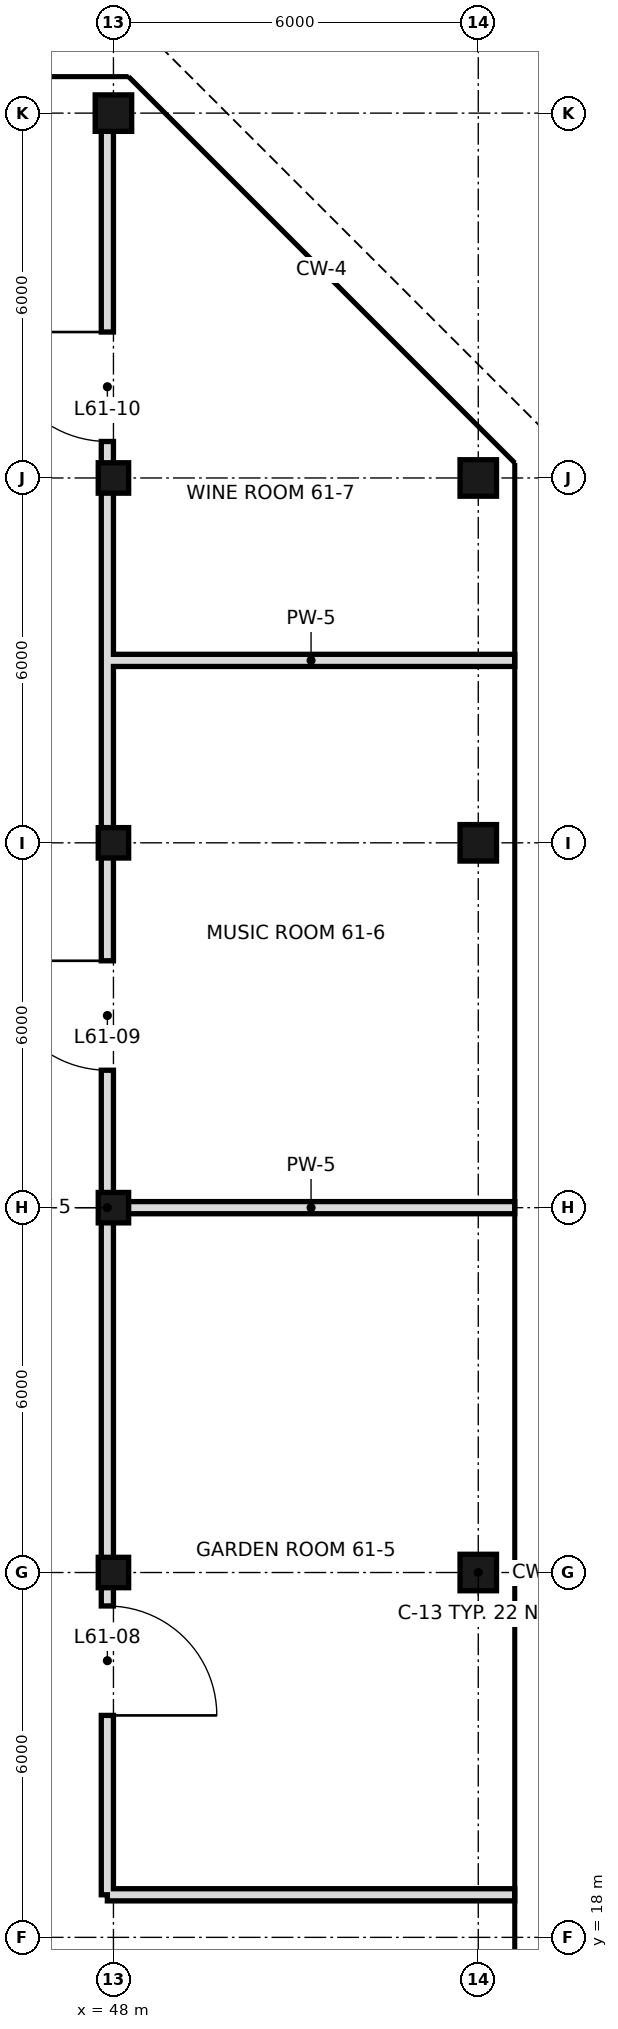
"""IFC4 building model, lengths in metres.
Left out: names, types, materials, properties, quantities, classifications, styles, units other than length and angle.
Written with IfcOpenShell. Run it as: python <this file> out.ifc"""

import sys

from ifc_helpers import new_model, si_unit, direction, frame, frame_2d, origin, origin_2d, place, context, subcontext, project, spatial, rectangle, hollow_rectangle, extrude, element, fill, save


model = new_model("IFC4")
c1 = context("Model", 3, precision=1e-05, world=origin(), true_north=direction((0.0, 1.0)))
c2 = subcontext(c1, "Body", "Model", "MODEL_VIEW")
j1 = project(units=[si_unit("LENGTHUNIT", "METRE"), si_unit("PLANEANGLEUNIT", "RADIAN")], contexts=[c1])
p1 = place(None, origin())
s1 = spatial("IfcSite", under=j1, at=p1, CompositionType="ELEMENT")
p2 = place(p1, origin())
s2 = spatial("IfcBuilding", under=s1, at=p2, CompositionType="ELEMENT")
p3 = place(p2, frame((0.0, 0.0, 257.6)))
s3 = spatial("IfcBuildingStorey", under=s2, at=p3, CompositionType="ELEMENT", Elevation=257.6)
for number, where, z_axis, x_axis in (
    (1, (48.0, 24.0, 0.0), (0.0, 0.0, 1.0), (1.0, 0.0, 0.0)),
    (2, (48.0, 30.0, 0.0), (0.0, 0.0, 1.0), (1.0, 0.0, 0.0)),
    (3, (48.0, 36.0, 0.0), (0.0, 0.0, 1.0), (1.0, 0.0, 0.0)),
    (4, (48.0, 42.0, 0.0), (0.0, 0.0, 1.0), (1.0, 0.0, 0.0)),
):
    element("IfcColumn", number, at=place(p3, frame(where, z_axis=z_axis, x_axis=x_axis)), inside=s3, PredefinedType="COLUMN", context=c2, shape_type="SweptSolid", body=[
        extrude(hollow_rectangle(XDim=0.5, YDim=0.5, WallThickness=0.025, at=origin_2d()), origin(), (0.0, 0.0, 1.0), 5.4),
    ])
for number, where, z_axis, x_axis in (
    (5, (48.0, 48.0, 0.0), (0.0, 0.0, 1.0), (1.0, 0.0, 0.0)),
    (6, (54.0, 24.0, 0.0), (0.0, 0.0, 1.0), (1.0, 0.0, 0.0)),
    (7, (54.0, 36.0, 0.0), (0.0, 0.0, 1.0), (1.0, 0.0, 0.0)),
    (8, (54.0, 42.0, 0.0), (0.0, 0.0, 1.0), (1.0, 0.0, 0.0)),
):
    element("IfcColumn", number, at=place(p3, frame(where, z_axis=z_axis, x_axis=x_axis)), inside=s3, PredefinedType="COLUMN", context=c2, shape_type="SweptSolid", body=[
        extrude(hollow_rectangle(XDim=0.6, YDim=0.6, WallThickness=0.028, at=origin_2d()), origin(), (0.0, 0.0, 1.0), 5.4),
    ])
p4 = place(p3, frame((47.9, 18.7, 0.0), z_axis=(0.0, 0.0, 1.0), x_axis=(0.0, 1.0, 0.0)))
e9 = element("IfcWall", 9, at=p4, inside=s3, PredefinedType="SOLIDWALL", context=c2, shape_type="SweptSolid", body=[
    extrude(rectangle(XDim=29.3, YDim=0.2, at=frame_2d((14.65, 0.0))), origin(), (0.0, 0.0, 1.0), 4.52),
])
p5 = place(p4, frame((2.95, 0.0, 0.0)))
e10 = element("IfcOpeningElement", 10, at=p5, cuts=e9, PredefinedType="OPENING", context=c2, shape_type="SweptSolid", body=[
    extrude(rectangle(XDim=1.8, YDim=2.4, at=frame_2d((0.9, 1.2))), frame((0.0, 0.11, 0.0), z_axis=(0.0, -1.0, 0.0), x_axis=(1.0, 0.0, 0.0)), (0.0, 0.0, 1.0), 0.22),
])
p6 = place(p4, frame((13.56, 0.0, 0.0)))
e11 = element("IfcOpeningElement", 11, at=p6, cuts=e9, PredefinedType="OPENING", context=c2, shape_type="SweptSolid", body=[
    extrude(rectangle(XDim=1.8, YDim=2.4, at=frame_2d((0.9, 1.2))), frame((0.0, 0.11, 0.0), z_axis=(0.0, -1.0, 0.0), x_axis=(1.0, 0.0, 0.0)), (0.0, 0.0, 1.0), 0.22),
])
p7 = place(p4, frame((23.9, 0.0, 0.0)))
e12 = element("IfcOpeningElement", 12, at=p7, cuts=e9, PredefinedType="OPENING", context=c2, shape_type="SweptSolid", body=[
    extrude(rectangle(XDim=1.8, YDim=2.4, at=frame_2d((0.9, 1.2))), frame((0.0, 0.11, 0.0), z_axis=(0.0, -1.0, 0.0), x_axis=(1.0, 0.0, 0.0)), (0.0, 0.0, 1.0), 0.22),
])
for number, where, z_axis, x_axis in (
    (13, (47.9, 18.7, 0.0), (0.0, 0.0, 1.0), (1.0, 0.0, 0.0)),
    (14, (47.9, 30.0, 0.0), (0.0, 0.0, 1.0), (1.0, 0.0, 0.0)),
):
    element("IfcWall", number, at=place(p3, frame(where, z_axis=z_axis, x_axis=x_axis)), inside=s3, PredefinedType="SOLIDWALL", context=c2, shape_type="SweptSolid", body=[
        extrude(rectangle(XDim=6.7, YDim=0.2, at=frame_2d((3.35, 0.0))), origin(), (0.0, 0.0, 1.0), 4.52),
    ])
p8 = place(p3, frame((47.9, 39.0, 0.0), z_axis=(0.0, 0.0, 1.0), x_axis=(1.0, 0.0, 0.0)))
e15 = element("IfcWall", 15, at=p8, inside=s3, PredefinedType="SOLIDWALL", context=c2, shape_type="SweptSolid", body=[
    extrude(rectangle(XDim=6.7, YDim=0.2, at=frame_2d((3.35, 0.0))), origin(), (0.0, 0.0, 1.0), 4.77),
])
p9 = place(p5, frame((1.8, 0.0, 0.0), z_axis=(0.0, 0.0, 1.0), x_axis=(-1.0, 0.0, 0.0)))
e16 = element("IfcDoor", 16, at=p9, inside=s3, OperationType="SINGLE_SWING_RIGHT", PredefinedType="DOOR", context=c2, shape_type="SweptSolid", body=[
    extrude(rectangle(XDim=1.8, YDim=2.4, at=frame_2d((0.9, 1.2))), frame((0.0, 0.025, 0.0), z_axis=(0.0, -1.0, 0.0), x_axis=(1.0, 0.0, 0.0)), (0.0, 0.0, 1.0), 0.05),
])
fill(e10, e16)
p10 = place(p6, frame((1.8, 0.0, 0.0), z_axis=(0.0, 0.0, 1.0), x_axis=(-1.0, 0.0, 0.0)))
e17 = element("IfcDoor", 17, at=p10, inside=s3, OperationType="SINGLE_SWING_LEFT", PredefinedType="DOOR", context=c2, shape_type="SweptSolid", body=[
    extrude(rectangle(XDim=1.8, YDim=2.4, at=frame_2d((0.9, 1.2))), frame((0.0, 0.025, 0.0), z_axis=(0.0, -1.0, 0.0), x_axis=(1.0, 0.0, 0.0)), (0.0, 0.0, 1.0), 0.05),
])
fill(e11, e17)
p11 = place(p7, frame((1.8, 0.0, 0.0), z_axis=(0.0, 0.0, 1.0), x_axis=(-1.0, 0.0, 0.0)))
e18 = element("IfcDoor", 18, at=p11, inside=s3, OperationType="SINGLE_SWING_LEFT", PredefinedType="DOOR", context=c2, shape_type="SweptSolid", body=[
    extrude(rectangle(XDim=1.8, YDim=2.4, at=frame_2d((0.9, 1.2))), frame((0.0, 0.025, 0.0), z_axis=(0.0, -1.0, 0.0), x_axis=(1.0, 0.0, 0.0)), (0.0, 0.0, 1.0), 0.05),
])
fill(e12, e18)
save(model, sys.argv[1])
